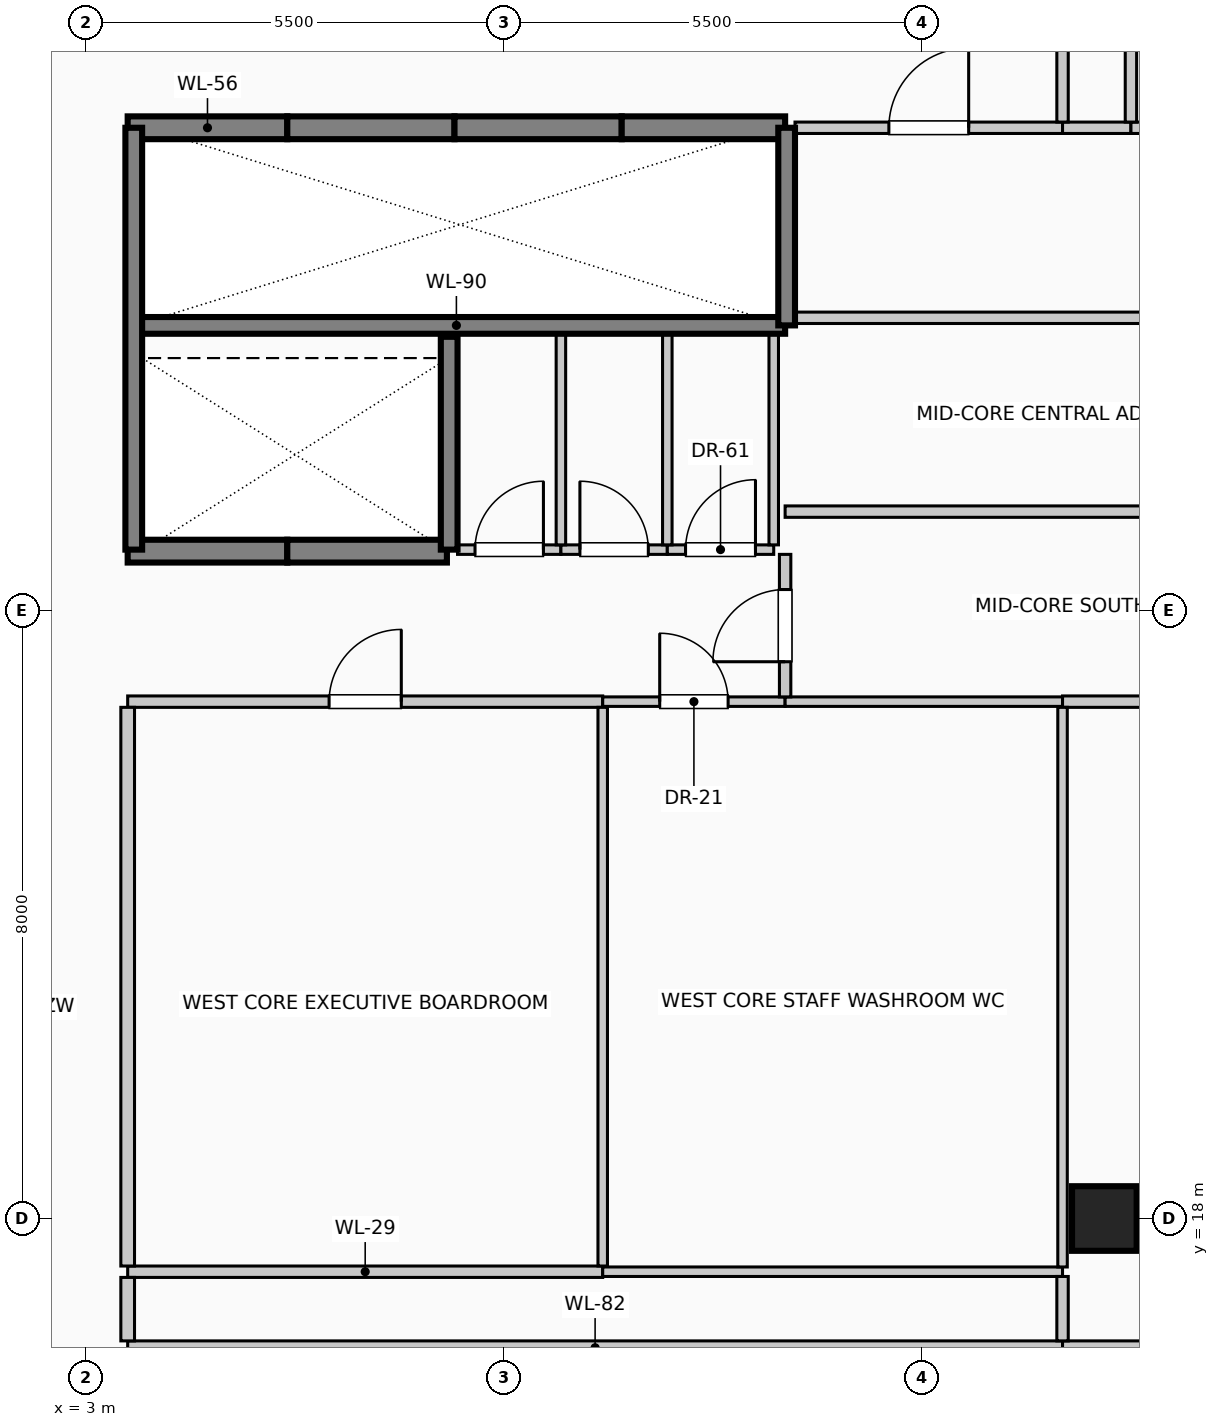
"""IFC4 building model, lengths in metres.
Left out: names, types, materials, properties, quantities, classifications, styles, units other than length and angle.
Written with IfcOpenShell. Run it as: python <this file> out.ifc"""

import sys

from ifc_helpers import new_model, si_unit, direction, frame, frame_2d, origin, origin_2d, place, context, subcontext, project, spatial, rectangle, circle, extrude, element, fill, save


model = new_model("IFC4")
c1 = context("Model", 3, precision=1e-05, world=origin(), true_north=direction((0.0, 1.0)))
c2 = subcontext(c1, "Body", "Model", "MODEL_VIEW")
j1 = project(units=[si_unit("LENGTHUNIT", "METRE"), si_unit("PLANEANGLEUNIT", "RADIAN")], contexts=[c1])
p1 = place(None, origin())
s1 = spatial("IfcSite", under=j1, at=p1, CompositionType="ELEMENT")
p2 = place(p1, origin())
s2 = spatial("IfcBuilding", under=s1, at=p2, CompositionType="ELEMENT")
p3 = place(p2, frame((0.0, 0.0, 218.6)))
s3 = spatial("IfcBuildingStorey", under=s2, at=p3, CompositionType="ELEMENT", Elevation=218.6)
p4 = place(p3, frame((16.4, 18.0, 0.0), z_axis=(0.0, 0.0, 1.0), x_axis=(1.0, 0.0, 0.0)))
e1 = element("IfcColumn", 1, at=p4, inside=s3, PredefinedType="COLUMN", context=c2, shape_type="SweptSolid", body=[
    extrude(circle(Radius=0.425, at=origin_2d()), origin(), (0.0, 0.0, 1.0), 4.0),
])
p5 = place(p3, frame((3.55, 32.35, 0.0), z_axis=(0.0, 0.0, 1.0), x_axis=(1.0, 0.0, 0.0)))
e2 = element("IfcWall", 2, at=p5, inside=s3, PredefinedType="SOLIDWALL", context=c2, shape_type="SweptSolid", body=[
    extrude(rectangle(XDim=2.1, YDim=0.3, at=frame_2d((1.05, 0.0))), origin(), (0.0, 0.0, 1.0), 4.0),
])
p6 = place(p3, frame((5.65, 32.35, 0.0), z_axis=(0.0, 0.0, 1.0), x_axis=(1.0, 0.0, 0.0)))
e3 = element("IfcWall", 3, at=p6, inside=s3, PredefinedType="SOLIDWALL", context=c2, shape_type="SweptSolid", body=[
    extrude(rectangle(XDim=2.2, YDim=0.3, at=frame_2d((1.1, 0.0))), origin(), (0.0, 0.0, 1.0), 4.0),
])
p7 = place(p3, frame((7.85, 32.35, 0.0), z_axis=(0.0, 0.0, 1.0), x_axis=(1.0, 0.0, 0.0)))
e4 = element("IfcWall", 4, at=p7, inside=s3, PredefinedType="SOLIDWALL", context=c2, shape_type="SweptSolid", body=[
    extrude(rectangle(XDim=2.2, YDim=0.3, at=frame_2d((1.1, 0.0))), origin(), (0.0, 0.0, 1.0), 4.0),
])
p8 = place(p3, frame((10.05, 32.35, 0.0), z_axis=(0.0, 0.0, 1.0), x_axis=(1.0, 0.0, 0.0)))
e5 = element("IfcWall", 5, at=p8, inside=s3, PredefinedType="SOLIDWALL", context=c2, shape_type="SweptSolid", body=[
    extrude(rectangle(XDim=2.15, YDim=0.3, at=frame_2d((1.075, 0.0))), origin(), (0.0, 0.0, 1.0), 4.0),
])
p9 = place(p3, frame((5.65, 26.78, 0.0), z_axis=(0.0, 0.0, 1.0), x_axis=(-1.0, 0.0, 0.0)))
e6 = element("IfcWall", 6, at=p9, inside=s3, PredefinedType="SOLIDWALL", context=c2, shape_type="SweptSolid", body=[
    extrude(rectangle(XDim=2.1, YDim=0.3, at=frame_2d((1.05, 0.0))), origin(), (0.0, 0.0, 1.0), 4.0),
])
p10 = place(p3, frame((7.75, 26.78, 0.0), z_axis=(0.0, 0.0, 1.0), x_axis=(-1.0, 0.0, 0.0)))
e7 = element("IfcWall", 7, at=p10, inside=s3, PredefinedType="SOLIDWALL", context=c2, shape_type="SweptSolid", body=[
    extrude(rectangle(XDim=2.1, YDim=0.3, at=frame_2d((1.05, 0.0))), origin(), (0.0, 0.0, 1.0), 4.0),
])
p11 = place(p3, frame((3.55, 29.75, 0.0), z_axis=(0.0, 0.0, 1.0), x_axis=(1.0, 0.0, 0.0)))
e8 = element("IfcWall", 8, at=p11, inside=s3, PredefinedType="SOLIDWALL", context=c2, shape_type="SweptSolid", body=[
    extrude(rectangle(XDim=8.65, YDim=0.22, at=frame_2d((4.325, 0.0))), origin(), (0.0, 0.0, 1.0), 4.0),
])
p12 = place(p3, frame((3.63, 26.8, 0.0), z_axis=(0.0, 0.0, 1.0), x_axis=(0.0, 1.0, 0.0)))
e9 = element("IfcWall", 9, at=p12, inside=s3, PredefinedType="SOLIDWALL", context=c2, shape_type="SweptSolid", body=[
    extrude(rectangle(XDim=5.55, YDim=0.22, at=frame_2d((2.775, 0.0))), origin(), (0.0, 0.0, 1.0), 4.0),
])
p13 = place(p3, frame((7.78, 26.8, 0.0), z_axis=(0.0, 0.0, 1.0), x_axis=(0.0, 1.0, 0.0)))
e10 = element("IfcWall", 10, at=p13, inside=s3, PredefinedType="SOLIDWALL", context=c2, shape_type="SweptSolid", body=[
    extrude(rectangle(XDim=2.8, YDim=0.22, at=frame_2d((1.4, 0.0))), origin(), (0.0, 0.0, 1.0), 4.0),
])
p14 = place(p3, frame((12.22, 29.75, 0.0), z_axis=(0.0, 0.0, 1.0), x_axis=(0.0, 1.0, 0.0)))
e11 = element("IfcWall", 11, at=p14, inside=s3, PredefinedType="SOLIDWALL", context=c2, shape_type="SweptSolid", body=[
    extrude(rectangle(XDim=2.6, YDim=0.22, at=frame_2d((1.3, 0.0))), origin(), (0.0, 0.0, 1.0), 4.0),
])
p15 = place(p3, frame((3.55, 16.3, 0.0), z_axis=(0.0, 0.0, 1.0), x_axis=(1.0, 0.0, 0.0)))
e12 = element("IfcWall", 12, at=p15, inside=s3, PredefinedType="PARTITIONING", context=c2, shape_type="SweptSolid", body=[
    extrude(rectangle(XDim=12.3, YDim=0.18, at=frame_2d((6.15, 0.0))), origin(), (0.0, 0.0, 1.0), 3.75),
])
p16 = place(p3, frame((15.85, 16.3, 0.0), z_axis=(0.0, 0.0, 1.0), x_axis=(1.0, 0.0, 0.0)))
e13 = element("IfcWall", 13, at=p16, inside=s3, PredefinedType="PARTITIONING", context=c2, shape_type="SweptSolid", body=[
    extrude(rectangle(XDim=5.15, YDim=0.18, at=frame_2d((2.575, 0.0))), origin(), (0.0, 0.0, 1.0), 3.75),
])
p17 = place(p16, frame((2.1, 0.0, 0.0)))
e14 = element("IfcOpeningElement", 14, at=p17, cuts=e13, PredefinedType="OPENING", context=c2, shape_type="SweptSolid", body=[
    extrude(rectangle(XDim=0.95, YDim=2.15, at=frame_2d((0.475, 1.075))), frame((0.0, 0.1, 0.0), z_axis=(0.0, -1.0, 0.0), x_axis=(1.0, 0.0, 0.0)), (0.0, 0.0, 1.0), 0.2),
])
p18 = place(p3, frame((3.55, 17.3, 0.0), z_axis=(0.0, 0.0, 1.0), x_axis=(1.0, 0.0, 0.0)))
e15 = element("IfcWall", 15, at=p18, inside=s3, PredefinedType="PARTITIONING", context=c2, shape_type="SweptSolid", body=[
    extrude(rectangle(XDim=6.25, YDim=0.15, at=frame_2d((3.125, 0.0))), origin(), (0.0, 0.0, 1.0), 3.75),
])
p19 = place(p3, frame((9.8, 17.3, 0.0), z_axis=(0.0, 0.0, 1.0), x_axis=(1.0, 0.0, 0.0)))
e16 = element("IfcWall", 16, at=p19, inside=s3, PredefinedType="PARTITIONING", context=c2, shape_type="SweptSolid", body=[
    extrude(rectangle(XDim=6.05, YDim=0.125, at=frame_2d((3.025, 0.0))), origin(), (0.0, 0.0, 1.0), 3.75),
])
p20 = place(p3, frame((3.55, 24.8, 0.0), z_axis=(0.0, 0.0, 1.0), x_axis=(1.0, 0.0, 0.0)))
e17 = element("IfcWall", 17, at=p20, inside=s3, PredefinedType="PARTITIONING", context=c2, shape_type="SweptSolid", body=[
    extrude(rectangle(XDim=6.25, YDim=0.15, at=frame_2d((3.125, 0.0))), origin(), (0.0, 0.0, 1.0), 3.75),
])
p21 = place(p20, frame((2.65, 0.0, 0.0)))
e18 = element("IfcOpeningElement", 18, at=p21, cuts=e17, PredefinedType="OPENING", context=c2, shape_type="SweptSolid", body=[
    extrude(rectangle(XDim=0.95, YDim=2.15, at=frame_2d((0.475, 1.075))), frame((0.0, 0.085, 0.0), z_axis=(0.0, -1.0, 0.0), x_axis=(1.0, 0.0, 0.0)), (0.0, 0.0, 1.0), 0.17),
])
p22 = place(p3, frame((9.8, 24.8, 0.0), z_axis=(0.0, 0.0, 1.0), x_axis=(1.0, 0.0, 0.0)))
e19 = element("IfcWall", 19, at=p22, inside=s3, PredefinedType="PARTITIONING", context=c2, shape_type="SweptSolid", body=[
    extrude(rectangle(XDim=2.4, YDim=0.125, at=frame_2d((1.2, 0.0))), origin(), (0.0, 0.0, 1.0), 3.75),
])
p23 = place(p22, frame((0.75, 0.0, 0.0)))
e20 = element("IfcOpeningElement", 20, at=p23, cuts=e19, PredefinedType="OPENING", context=c2, shape_type="SweptSolid", body=[
    extrude(rectangle(XDim=0.9, YDim=2.1, at=frame_2d((0.45, 1.05))), frame((0.0, 0.073, 0.0), z_axis=(0.0, -1.0, 0.0), x_axis=(1.0, 0.0, 0.0)), (0.0, 0.0, 1.0), 0.145),
])
p24 = place(p3, frame((12.2, 24.8, 0.0), z_axis=(0.0, 0.0, 1.0), x_axis=(1.0, 0.0, 0.0)))
e21 = element("IfcWall", 21, at=p24, inside=s3, PredefinedType="PARTITIONING", context=c2, shape_type="SweptSolid", body=[
    extrude(rectangle(XDim=3.65, YDim=0.125, at=frame_2d((1.825, 0.0))), origin(), (0.0, 0.0, 1.0), 3.75),
])
p25 = place(p3, frame((15.85, 24.8, 0.0), z_axis=(0.0, 0.0, 1.0), x_axis=(1.0, 0.0, 0.0)))
e22 = element("IfcWall", 22, at=p25, inside=s3, PredefinedType="PARTITIONING", context=c2, shape_type="SweptSolid", body=[
    extrude(rectangle(XDim=5.15, YDim=0.15, at=frame_2d((2.575, 0.0))), origin(), (0.0, 0.0, 1.0), 3.75),
])
p26 = place(p3, frame((7.89, 26.8, 0.0), z_axis=(0.0, 0.0, 1.0), x_axis=(1.0, 0.0, 0.0)))
e23 = element("IfcWall", 23, at=p26, inside=s3, PredefinedType="PARTITIONING", context=c2, shape_type="SweptSolid", body=[
    extrude(rectangle(XDim=1.36, YDim=0.125, at=frame_2d((0.68, 0.0))), origin(), (0.0, 0.0, 1.0), 3.75),
])
p27 = place(p26, frame((0.23, 0.0, 0.0)))
e24 = element("IfcOpeningElement", 24, at=p27, cuts=e23, PredefinedType="OPENING", context=c2, shape_type="SweptSolid", body=[
    extrude(rectangle(XDim=0.9, YDim=2.1, at=frame_2d((0.45, 1.05))), frame((0.0, 0.073, 0.0), z_axis=(0.0, -1.0, 0.0), x_axis=(1.0, 0.0, 0.0)), (0.0, 0.0, 1.0), 0.145),
])
p28 = place(p3, frame((9.25, 26.8, 0.0), z_axis=(0.0, 0.0, 1.0), x_axis=(1.0, 0.0, 0.0)))
e25 = element("IfcWall", 25, at=p28, inside=s3, PredefinedType="PARTITIONING", context=c2, shape_type="SweptSolid", body=[
    extrude(rectangle(XDim=1.4, YDim=0.125, at=frame_2d((0.7, 0.0))), origin(), (0.0, 0.0, 1.0), 3.75),
])
p29 = place(p28, frame((0.25, 0.0, 0.0)))
e26 = element("IfcOpeningElement", 26, at=p29, cuts=e25, PredefinedType="OPENING", context=c2, shape_type="SweptSolid", body=[
    extrude(rectangle(XDim=0.9, YDim=2.1, at=frame_2d((0.45, 1.05))), frame((0.0, 0.073, 0.0), z_axis=(0.0, -1.0, 0.0), x_axis=(1.0, 0.0, 0.0)), (0.0, 0.0, 1.0), 0.145),
])
p30 = place(p3, frame((10.65, 26.8, 0.0), z_axis=(0.0, 0.0, 1.0), x_axis=(1.0, 0.0, 0.0)))
e27 = element("IfcWall", 27, at=p30, inside=s3, PredefinedType="PARTITIONING", context=c2, shape_type="SweptSolid", body=[
    extrude(rectangle(XDim=1.4, YDim=0.125, at=frame_2d((0.7, 0.0))), origin(), (0.0, 0.0, 1.0), 3.75),
])
p31 = place(p30, frame((0.24, 0.0, 0.0)))
e28 = element("IfcOpeningElement", 28, at=p31, cuts=e27, PredefinedType="OPENING", context=c2, shape_type="SweptSolid", body=[
    extrude(rectangle(XDim=0.92, YDim=2.1, at=frame_2d((0.46, 1.05))), frame((0.0, 0.073, 0.0), z_axis=(0.0, -1.0, 0.0), x_axis=(1.0, 0.0, 0.0)), (0.0, 0.0, 1.0), 0.145),
])
p32 = place(p3, frame((12.2, 27.3, 0.0), z_axis=(0.0, 0.0, 1.0), x_axis=(1.0, 0.0, 0.0)))
e29 = element("IfcWall", 29, at=p32, inside=s3, PredefinedType="PARTITIONING", context=c2, shape_type="SweptSolid", body=[
    extrude(rectangle(XDim=8.8, YDim=0.15, at=frame_2d((4.4, 0.0))), origin(), (0.0, 0.0, 1.0), 3.75),
])
p33 = place(p3, frame((12.33, 29.85, 0.0), z_axis=(0.0, 0.0, 1.0), x_axis=(1.0, 0.0, 0.0)))
e30 = element("IfcWall", 30, at=p33, inside=s3, PredefinedType="PARTITIONING", context=c2, shape_type="SweptSolid", body=[
    extrude(rectangle(XDim=8.67, YDim=0.15, at=frame_2d((4.335, 0.0))), origin(), (0.0, 0.0, 1.0), 3.75),
])
p34 = place(p3, frame((12.33, 32.35, 0.0), z_axis=(0.0, 0.0, 1.0), x_axis=(1.0, 0.0, 0.0)))
e31 = element("IfcWall", 31, at=p34, inside=s3, PredefinedType="PARTITIONING", context=c2, shape_type="SweptSolid", body=[
    extrude(rectangle(XDim=3.52, YDim=0.15, at=frame_2d((1.76, 0.0))), origin(), (0.0, 0.0, 1.0), 3.75),
])
p35 = place(p34, frame((1.235, 0.0, 0.0)))
e32 = element("IfcOpeningElement", 32, at=p35, cuts=e31, PredefinedType="OPENING", context=c2, shape_type="SweptSolid", body=[
    extrude(rectangle(XDim=1.05, YDim=2.15, at=frame_2d((0.525, 1.075))), frame((0.0, 0.085, 0.0), z_axis=(0.0, -1.0, 0.0), x_axis=(1.0, 0.0, 0.0)), (0.0, 0.0, 1.0), 0.17),
])
p36 = place(p3, frame((15.85, 32.35, 0.0), z_axis=(0.0, 0.0, 1.0), x_axis=(1.0, 0.0, 0.0)))
e33 = element("IfcWall", 33, at=p36, inside=s3, PredefinedType="PARTITIONING", context=c2, shape_type="SweptSolid", body=[
    extrude(rectangle(XDim=0.9, YDim=0.15, at=frame_2d((0.45, 0.0))), origin(), (0.0, 0.0, 1.0), 3.75),
])
p37 = place(p3, frame((16.75, 32.35, 0.0), z_axis=(0.0, 0.0, 1.0), x_axis=(1.0, 0.0, 0.0)))
e34 = element("IfcWall", 34, at=p37, inside=s3, PredefinedType="PARTITIONING", context=c2, shape_type="SweptSolid", body=[
    extrude(rectangle(XDim=4.25, YDim=0.15, at=frame_2d((2.125, 0.0))), origin(), (0.0, 0.0, 1.0), 3.75),
])
p38 = place(p3, frame((3.55, 16.39, 0.0), z_axis=(0.0, 0.0, 1.0), x_axis=(0.0, 1.0, 0.0)))
e35 = element("IfcWall", 35, at=p38, inside=s3, PredefinedType="PARTITIONING", context=c2, shape_type="SweptSolid", body=[
    extrude(rectangle(XDim=0.835, YDim=0.18, at=frame_2d((0.417, 0.0))), origin(), (0.0, 0.0, 1.0), 3.75),
])
p39 = place(p3, frame((3.55, 17.375, 0.0), z_axis=(0.0, 0.0, 1.0), x_axis=(0.0, 1.0, 0.0)))
e36 = element("IfcWall", 36, at=p39, inside=s3, PredefinedType="PARTITIONING", context=c2, shape_type="SweptSolid", body=[
    extrude(rectangle(XDim=7.35, YDim=0.18, at=frame_2d((3.675, 0.0))), origin(), (0.0, 0.0, 1.0), 3.75),
])
p40 = place(p3, frame((9.25, 26.863, 0.0), z_axis=(0.0, 0.0, 1.0), x_axis=(0.0, 1.0, 0.0)))
e37 = element("IfcWall", 37, at=p40, inside=s3, PredefinedType="PARTITIONING", context=c2, shape_type="SweptSolid", body=[
    extrude(rectangle(XDim=2.777, YDim=0.125, at=frame_2d((1.389, 0.0))), origin(), (0.0, 0.0, 1.0), 3.75),
])
p41 = place(p3, frame((9.8, 17.375, 0.0), z_axis=(0.0, 0.0, 1.0), x_axis=(0.0, 1.0, 0.0)))
e38 = element("IfcWall", 38, at=p41, inside=s3, PredefinedType="PARTITIONING", context=c2, shape_type="SweptSolid", body=[
    extrude(rectangle(XDim=7.35, YDim=0.125, at=frame_2d((3.675, 0.0))), origin(), (0.0, 0.0, 1.0), 3.75),
])
for number, where, z_axis, x_axis in (
    (39, (10.65, 26.863, 0.0), (0.0, 0.0, 1.0), (0.0, 1.0, 0.0)),
    (40, (12.05, 26.863, 0.0), (0.0, 0.0, 1.0), (0.0, 1.0, 0.0)),
):
    element("IfcWall", number, at=place(p3, frame(where, z_axis=z_axis, x_axis=x_axis)), inside=s3, PredefinedType="PARTITIONING", context=c2, shape_type="SweptSolid", body=[
        extrude(rectangle(XDim=2.777, YDim=0.125, at=frame_2d((1.389, 0.0))), origin(), (0.0, 0.0, 1.0), 3.75),
    ])
p42 = place(p3, frame((12.2, 24.863, 0.0), z_axis=(0.0, 0.0, 1.0), x_axis=(0.0, 1.0, 0.0)))
e41 = element("IfcWall", 41, at=p42, inside=s3, PredefinedType="PARTITIONING", context=c2, shape_type="SweptSolid", body=[
    extrude(rectangle(XDim=1.875, YDim=0.15, at=frame_2d((0.938, 0.0))), origin(), (0.0, 0.0, 1.0), 3.75),
])
p43 = place(p42, frame((0.462, 0.0, 0.0)))
e42 = element("IfcOpeningElement", 42, at=p43, cuts=e41, PredefinedType="OPENING", context=c2, shape_type="SweptSolid", body=[
    extrude(rectangle(XDim=0.95, YDim=2.15, at=frame_2d((0.475, 1.075))), frame((0.0, 0.085, 0.0), z_axis=(0.0, -1.0, 0.0), x_axis=(1.0, 0.0, 0.0)), (0.0, 0.0, 1.0), 0.17),
])
p44 = place(p3, frame((15.85, 16.39, 0.0), z_axis=(0.0, 0.0, 1.0), x_axis=(0.0, 1.0, 0.0)))
e43 = element("IfcWall", 43, at=p44, inside=s3, PredefinedType="PARTITIONING", context=c2, shape_type="SweptSolid", body=[
    extrude(rectangle(XDim=0.848, YDim=0.15, at=frame_2d((0.424, 0.0))), origin(), (0.0, 0.0, 1.0), 3.75),
])
p45 = place(p3, frame((15.85, 17.363, 0.0), z_axis=(0.0, 0.0, 1.0), x_axis=(0.0, 1.0, 0.0)))
e44 = element("IfcWall", 44, at=p45, inside=s3, PredefinedType="PARTITIONING", context=c2, shape_type="SweptSolid", body=[
    extrude(rectangle(XDim=7.363, YDim=0.125, at=frame_2d((3.681, 0.0))), origin(), (0.0, 0.0, 1.0), 3.75),
])
p46 = place(p3, frame((15.85, 32.425, 0.0), z_axis=(0.0, 0.0, 1.0), x_axis=(0.0, 1.0, 0.0)))
e45 = element("IfcWall", 45, at=p46, inside=s3, PredefinedType="PARTITIONING", context=c2, shape_type="SweptSolid", body=[
    extrude(rectangle(XDim=1.725, YDim=0.15, at=frame_2d((0.862, 0.0))), origin(), (0.0, 0.0, 1.0), 3.75),
])
p47 = place(p3, frame((16.75, 32.425, 0.0), z_axis=(0.0, 0.0, 1.0), x_axis=(0.0, 1.0, 0.0)))
e46 = element("IfcWall", 46, at=p47, inside=s3, PredefinedType="PARTITIONING", context=c2, shape_type="SweptSolid", body=[
    extrude(rectangle(XDim=1.15, YDim=0.15, at=frame_2d((0.575, 0.0))), origin(), (0.0, 0.0, 1.0), 3.75),
])
p48 = place(p21, origin())
e47 = element("IfcDoor", 47, at=p48, inside=s3, OperationType="SINGLE_SWING_RIGHT", PredefinedType="DOOR", context=c2, shape_type="SweptSolid", body=[
    extrude(rectangle(XDim=0.95, YDim=2.15, at=frame_2d((0.475, 1.075))), frame((0.0, 0.025, 0.0), z_axis=(0.0, -1.0, 0.0), x_axis=(1.0, 0.0, 0.0)), (0.0, 0.0, 1.0), 0.05),
])
fill(e18, e47)
p49 = place(p23, origin())
e48 = element("IfcDoor", 48, at=p49, inside=s3, OperationType="SINGLE_SWING_LEFT", PredefinedType="DOOR", context=c2, shape_type="SweptSolid", body=[
    extrude(rectangle(XDim=0.9, YDim=2.1, at=frame_2d((0.45, 1.05))), frame((0.0, 0.025, 0.0), z_axis=(0.0, -1.0, 0.0), x_axis=(1.0, 0.0, 0.0)), (0.0, 0.0, 1.0), 0.05),
])
fill(e20, e48)
p50 = place(p27, origin())
e49 = element("IfcDoor", 49, at=p50, inside=s3, OperationType="SINGLE_SWING_RIGHT", PredefinedType="DOOR", context=c2, shape_type="SweptSolid", body=[
    extrude(rectangle(XDim=0.9, YDim=2.1, at=frame_2d((0.45, 1.05))), frame((0.0, 0.025, 0.0), z_axis=(0.0, -1.0, 0.0), x_axis=(1.0, 0.0, 0.0)), (0.0, 0.0, 1.0), 0.05),
])
fill(e24, e49)
p51 = place(p29, origin())
e50 = element("IfcDoor", 50, at=p51, inside=s3, OperationType="SINGLE_SWING_LEFT", PredefinedType="DOOR", context=c2, shape_type="SweptSolid", body=[
    extrude(rectangle(XDim=0.9, YDim=2.1, at=frame_2d((0.45, 1.05))), frame((0.0, 0.025, 0.0), z_axis=(0.0, -1.0, 0.0), x_axis=(1.0, 0.0, 0.0)), (0.0, 0.0, 1.0), 0.05),
])
fill(e26, e50)
p52 = place(p31, origin())
e51 = element("IfcDoor", 51, at=p52, inside=s3, OperationType="SINGLE_SWING_RIGHT", PredefinedType="DOOR", context=c2, shape_type="SweptSolid", body=[
    extrude(rectangle(XDim=0.92, YDim=2.1, at=frame_2d((0.46, 1.05))), frame((0.0, 0.025, 0.0), z_axis=(0.0, -1.0, 0.0), x_axis=(1.0, 0.0, 0.0)), (0.0, 0.0, 1.0), 0.05),
])
fill(e28, e51)
p53 = place(p35, origin())
e52 = element("IfcDoor", 52, at=p53, inside=s3, OperationType="SINGLE_SWING_RIGHT", PredefinedType="DOOR", context=c2, shape_type="SweptSolid", body=[
    extrude(rectangle(XDim=1.05, YDim=2.15, at=frame_2d((0.525, 1.075))), frame((0.0, 0.025, 0.0), z_axis=(0.0, -1.0, 0.0), x_axis=(1.0, 0.0, 0.0)), (0.0, 0.0, 1.0), 0.05),
])
fill(e32, e52)
p54 = place(p43, origin())
e53 = element("IfcDoor", 53, at=p54, inside=s3, OperationType="SINGLE_SWING_LEFT", PredefinedType="DOOR", context=c2, shape_type="SweptSolid", body=[
    extrude(rectangle(XDim=0.95, YDim=2.15, at=frame_2d((0.475, 1.075))), frame((0.0, 0.025, 0.0), z_axis=(0.0, -1.0, 0.0), x_axis=(1.0, 0.0, 0.0)), (0.0, 0.0, 1.0), 0.05),
])
fill(e42, e53)
save(model, sys.argv[1])
